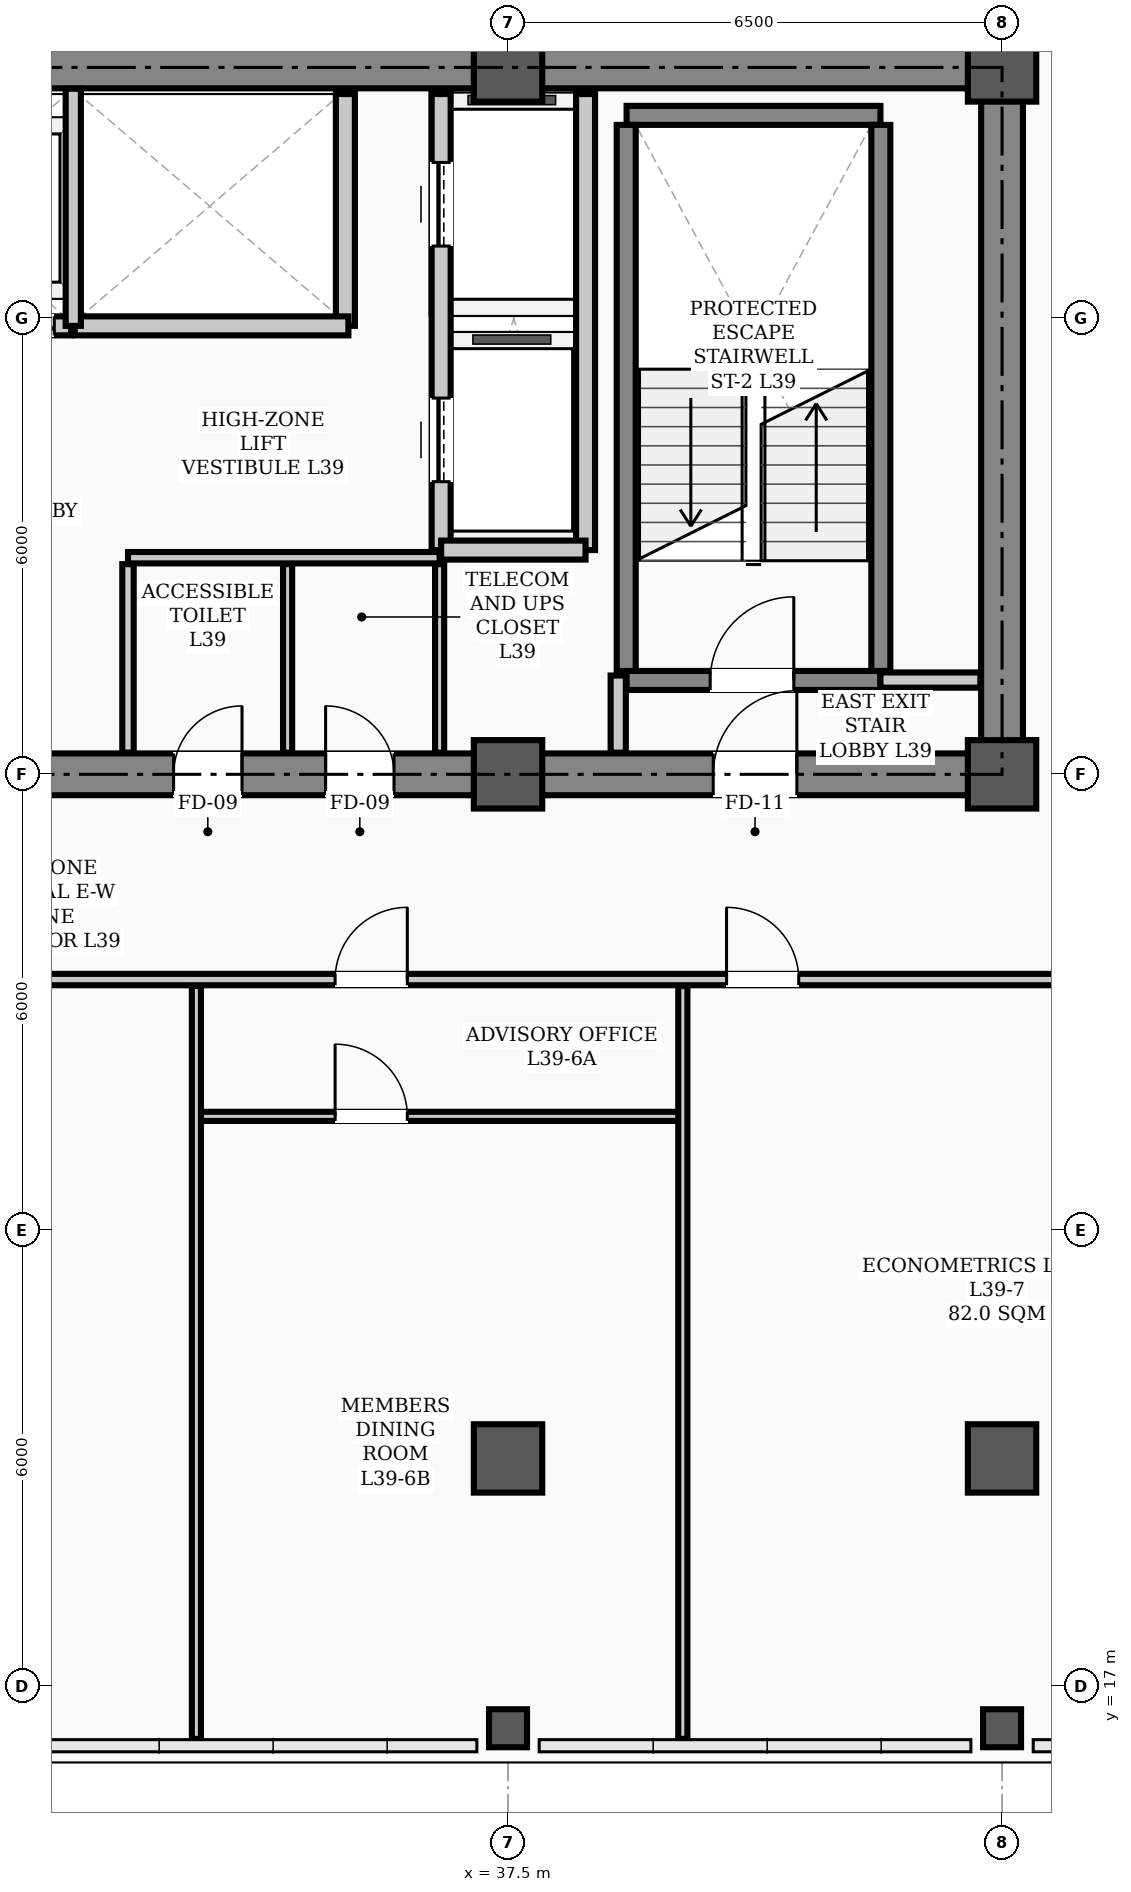
"""IFC4 building model, lengths in metres.
Left out: names, types, materials, properties, quantities, classifications, styles, units other than length and angle.
Written with IfcOpenShell. Run it as: python <this file> out.ifc"""

import sys

from ifc_helpers import new_model, si_unit, direction, frame, frame_2d, origin, origin_2d, place, context, subcontext, project, spatial, rectangle, hollow_rectangle, extrude, element, fill, save


model = new_model("IFC4")
c1 = context("Model", 3, precision=1e-05, world=origin(), true_north=direction((0.0, 1.0)))
c2 = subcontext(c1, "Body", "Model", "MODEL_VIEW")
j1 = project(units=[si_unit("LENGTHUNIT", "METRE"), si_unit("PLANEANGLEUNIT", "RADIAN")], contexts=[c1])
p1 = place(None, origin())
s1 = spatial("IfcSite", under=j1, at=p1, CompositionType="ELEMENT")
p2 = place(p1, origin())
s2 = spatial("IfcBuilding", under=s1, at=p2, CompositionType="ELEMENT")
p3 = place(p2, frame((0.0, 0.0, 157.8)))
s3 = spatial("IfcBuildingStorey", under=s2, at=p3, CompositionType="ELEMENT", Elevation=157.8)
for number, where, z_axis, x_axis in (
    (1, (37.5, 29.0, 0.0), (0.0, 0.0, 1.0), (1.0, 0.0, 0.0)),
    (2, (37.5, 38.3, 0.0), (0.0, 0.0, 1.0), (1.0, 0.0, 0.0)),
    (3, (44.0, 29.0, 0.0), (0.0, 0.0, 1.0), (1.0, 0.0, 0.0)),
    (4, (44.0, 38.3, 0.0), (0.0, 0.0, 1.0), (1.0, 0.0, 0.0)),
    (5, (37.5, 20.0, 0.0), (0.0, 0.0, 1.0), (1.0, 0.0, 0.0)),
    (6, (44.0, 20.0, 0.0), (0.0, 0.0, 1.0), (1.0, 0.0, 0.0)),
):
    element("IfcColumn", number, at=place(p3, frame(where, z_axis=z_axis, x_axis=x_axis)), inside=s3, PredefinedType="COLUMN", context=c2, shape_type="SweptSolid", body=[
        extrude(hollow_rectangle(XDim=0.9, YDim=0.9, WallThickness=0.035, InnerFilletRadius=0.017, OuterFilletRadius=0.052, at=origin_2d()), origin(), (0.0, 0.0, 1.0), 3.9),
    ])
for number, where, z_axis, x_axis in (
    (7, (37.5, 16.45, 0.0), (0.0, 0.0, 1.0), (1.0, 0.0, 0.0)),
    (8, (44.0, 16.45, 0.0), (0.0, 0.0, 1.0), (1.0, 0.0, 0.0)),
):
    element("IfcColumn", number, at=place(p3, frame(where, z_axis=z_axis, x_axis=x_axis)), inside=s3, PredefinedType="COLUMN", context=c2, shape_type="SweptSolid", body=[
        extrude(hollow_rectangle(XDim=0.5, YDim=0.5, WallThickness=0.024, InnerFilletRadius=0.012, OuterFilletRadius=0.036, at=origin_2d()), origin(), (0.0, 0.0, 1.0), 3.9),
    ])
p4 = place(p3, frame((13.5, 29.0, 0.0), z_axis=(0.0, 0.0, 1.0), x_axis=(1.0, 0.0, 0.0)))
e9 = element("IfcWall", 9, at=p4, inside=s3, PredefinedType="SHEAR", context=c2, shape_type="SweptSolid", body=[
    extrude(rectangle(XDim=30.5, YDim=0.55, at=frame_2d((15.25, 0.0))), origin(), (0.0, 0.0, 1.0), 3.72),
])
p5 = place(p4, frame((1.75, 0.0, 0.0)))
e10 = element("IfcOpeningElement", 10, at=p5, cuts=e9, PredefinedType="OPENING", context=c2, shape_type="SweptSolid", body=[
    extrude(rectangle(XDim=1.1, YDim=2.08, at=frame_2d((0.55, 1.04))), frame((0.0, 0.285, 0.0), z_axis=(0.0, -1.0, 0.0), x_axis=(1.0, 0.0, 0.0)), (0.0, 0.0, 1.0), 0.57),
])
p6 = place(p4, frame((26.7, 0.0, 0.0)))
e11 = element("IfcOpeningElement", 11, at=p6, cuts=e9, PredefinedType="OPENING", context=c2, shape_type="SweptSolid", body=[
    extrude(rectangle(XDim=1.1, YDim=2.08, at=frame_2d((0.55, 1.04))), frame((0.0, 0.285, 0.0), z_axis=(0.0, -1.0, 0.0), x_axis=(1.0, 0.0, 0.0)), (0.0, 0.0, 1.0), 0.57),
])
p7 = place(p4, frame((6.8, 0.0, 0.0)))
e12 = element("IfcOpeningElement", 12, at=p7, cuts=e9, PredefinedType="OPENING", context=c2, shape_type="SweptSolid", body=[
    extrude(rectangle(XDim=1.1, YDim=2.08, at=frame_2d((0.55, 1.04))), frame((0.0, 0.285, 0.0), z_axis=(0.0, -1.0, 0.0), x_axis=(1.0, 0.0, 0.0)), (0.0, 0.0, 1.0), 0.57),
])
p8 = place(p4, frame((13.2, 0.0, 0.0)))
e13 = element("IfcOpeningElement", 13, at=p8, cuts=e9, PredefinedType="OPENING", context=c2, shape_type="SweptSolid", body=[
    extrude(rectangle(XDim=1.6, YDim=2.08, at=frame_2d((0.8, 1.04))), frame((0.0, 0.285, 0.0), z_axis=(0.0, -1.0, 0.0), x_axis=(1.0, 0.0, 0.0)), (0.0, 0.0, 1.0), 0.57),
])
p9 = place(p4, frame((19.6, 0.0, 0.0)))
e14 = element("IfcOpeningElement", 14, at=p9, cuts=e9, PredefinedType="OPENING", context=c2, shape_type="SweptSolid", body=[
    extrude(rectangle(XDim=0.9, YDim=2.08, at=frame_2d((0.45, 1.04))), frame((0.0, 0.285, 0.0), z_axis=(0.0, -1.0, 0.0), x_axis=(1.0, 0.0, 0.0)), (0.0, 0.0, 1.0), 0.57),
])
p10 = place(p4, frame((21.6, 0.0, 0.0)))
e15 = element("IfcOpeningElement", 15, at=p10, cuts=e9, PredefinedType="OPENING", context=c2, shape_type="SweptSolid", body=[
    extrude(rectangle(XDim=0.9, YDim=2.08, at=frame_2d((0.45, 1.04))), frame((0.0, 0.285, 0.0), z_axis=(0.0, -1.0, 0.0), x_axis=(1.0, 0.0, 0.0)), (0.0, 0.0, 1.0), 0.57),
])
p11 = place(p3, frame((13.5, 38.3, 0.0), z_axis=(0.0, 0.0, 1.0), x_axis=(1.0, 0.0, 0.0)))
e16 = element("IfcWall", 16, at=p11, inside=s3, PredefinedType="SHEAR", context=c2, shape_type="SweptSolid", body=[
    extrude(rectangle(XDim=30.5, YDim=0.55, at=frame_2d((15.25, 0.0))), origin(), (0.0, 0.0, 1.0), 3.72),
])
p12 = place(p3, frame((44.0, 29.35, 0.0), z_axis=(0.0, 0.0, 1.0), x_axis=(0.0, 1.0, 0.0)))
e17 = element("IfcWall", 17, at=p12, inside=s3, PredefinedType="SHEAR", context=c2, shape_type="SweptSolid", body=[
    extrude(rectangle(XDim=8.6, YDim=0.55, at=frame_2d((4.3, 0.0))), origin(), (0.0, 0.0, 1.0), 3.72),
])
p13 = place(p3, frame((39.06, 30.235, 0.0), z_axis=(0.0, 0.0, 1.0), x_axis=(1.0, 0.0, 0.0)))
e18 = element("IfcWall", 18, at=p13, inside=s3, PredefinedType="STANDARD", context=c2, shape_type="SweptSolid", body=[
    extrude(rectangle(XDim=3.34, YDim=0.25, at=frame_2d((1.67, 0.0))), origin(), (0.0, 0.0, 1.0), 3.72),
])
p14 = place(p13, frame((1.1, 0.0, 0.0)))
e19 = element("IfcOpeningElement", 19, at=p14, cuts=e18, PredefinedType="OPENING", context=c2, shape_type="SweptSolid", body=[
    extrude(rectangle(XDim=1.1, YDim=2.08, at=frame_2d((0.55, 1.04))), frame((0.0, 0.135, 0.0), z_axis=(0.0, -1.0, 0.0), x_axis=(1.0, 0.0, 0.0)), (0.0, 0.0, 1.0), 0.27),
])
p15 = place(p3, frame((39.06, 37.669, 0.0), z_axis=(0.0, 0.0, 1.0), x_axis=(1.0, 0.0, 0.0)))
e20 = element("IfcWall", 20, at=p15, inside=s3, PredefinedType="STANDARD", context=c2, shape_type="SweptSolid", body=[
    extrude(rectangle(XDim=3.34, YDim=0.25, at=frame_2d((1.67, 0.0))), origin(), (0.0, 0.0, 1.0), 3.72),
])
for number, where, z_axis, x_axis in (
    (21, (39.055, 30.36, 0.0), (0.0, 0.0, 1.0), (0.0, 1.0, 0.0)),
    (22, (42.405, 30.36, 0.0), (0.0, 0.0, 1.0), (0.0, 1.0, 0.0)),
):
    element("IfcWall", number, at=place(p3, frame(where, z_axis=z_axis, x_axis=x_axis)), inside=s3, PredefinedType="STANDARD", context=c2, shape_type="SweptSolid", body=[
        extrude(rectangle(XDim=7.184, YDim=0.25, at=frame_2d((3.592, 0.0))), origin(), (0.0, 0.0, 1.0), 3.72),
    ])
p16 = place(p3, frame((36.62, 31.95, 0.0), z_axis=(0.0, 0.0, 1.0), x_axis=(0.0, 1.0, 0.0)))
e23 = element("IfcWall", 23, at=p16, inside=s3, PredefinedType="STANDARD", context=c2, shape_type="SweptSolid", body=[
    extrude(rectangle(XDim=6.0, YDim=0.25, at=frame_2d((3.0, 0.0))), origin(), (0.0, 0.0, 1.0), 3.35),
])
p17 = place(p16, frame((0.9, 0.0, 0.0)))
e24 = element("IfcOpeningElement", 24, at=p17, cuts=e23, PredefinedType="OPENING", context=c2, shape_type="SweptSolid", body=[
    extrude(rectangle(XDim=1.1, YDim=2.08, at=frame_2d((0.55, 1.04))), frame((0.0, 0.135, 0.0), z_axis=(0.0, -1.0, 0.0), x_axis=(1.0, 0.0, 0.0)), (0.0, 0.0, 1.0), 0.27),
])
p18 = place(p16, frame((4.0, 0.0, 0.0)))
e25 = element("IfcOpeningElement", 25, at=p18, cuts=e23, PredefinedType="OPENING", context=c2, shape_type="SweptSolid", body=[
    extrude(rectangle(XDim=1.1, YDim=2.08, at=frame_2d((0.55, 1.04))), frame((0.0, 0.135, 0.0), z_axis=(0.0, -1.0, 0.0), x_axis=(1.0, 0.0, 0.0)), (0.0, 0.0, 1.0), 0.27),
])
p19 = place(p3, frame((38.52, 31.95, 0.0), z_axis=(0.0, 0.0, 1.0), x_axis=(0.0, 1.0, 0.0)))
e26 = element("IfcWall", 26, at=p19, inside=s3, PredefinedType="STANDARD", context=c2, shape_type="SweptSolid", body=[
    extrude(rectangle(XDim=6.0, YDim=0.25, at=frame_2d((3.0, 0.0))), origin(), (0.0, 0.0, 1.0), 3.35),
])
p20 = place(p3, frame((36.62, 31.95, 0.0), z_axis=(0.0, 0.0, 1.0), x_axis=(1.0, 0.0, 0.0)))
e27 = element("IfcWall", 27, at=p20, inside=s3, PredefinedType="STANDARD", context=c2, shape_type="SweptSolid", body=[
    extrude(rectangle(XDim=1.9, YDim=0.25, at=frame_2d((0.95, 0.0))), origin(), (0.0, 0.0, 1.0), 3.48),
])
p21 = place(p3, frame((35.36, 34.9, 0.0), z_axis=(0.0, 0.0, 1.0), x_axis=(0.0, 1.0, 0.0)))
e28 = element("IfcWall", 28, at=p21, inside=s3, PredefinedType="STANDARD", context=c2, shape_type="SweptSolid", body=[
    extrude(rectangle(XDim=3.05, YDim=0.25, at=frame_2d((1.525, 0.0))), origin(), (0.0, 0.0, 1.0), 3.35),
])
p22 = place(p3, frame((28.2, 34.9, 0.0), z_axis=(0.0, 0.0, 1.0), x_axis=(1.0, 0.0, 0.0)))
e29 = element("IfcWall", 29, at=p22, inside=s3, PredefinedType="STANDARD", context=c2, shape_type="SweptSolid", body=[
    extrude(rectangle(XDim=3.55, YDim=0.25, at=frame_2d((1.775, 0.0))), origin(), (0.0, 0.0, 1.0), 3.72),
])
p23 = place(p22, frame((0.23, 0.0, 0.0)))
e30 = element("IfcOpeningElement", 30, at=p23, cuts=e29, PredefinedType="OPENING", context=c2, shape_type="SweptSolid", body=[
    extrude(rectangle(XDim=1.3, YDim=2.08, at=frame_2d((0.65, 1.04))), frame((0.0, 0.135, 0.0), z_axis=(0.0, -1.0, 0.0), x_axis=(1.0, 0.0, 0.0)), (0.0, 0.0, 1.0), 0.27),
])
p24 = place(p22, frame((2.03, 0.0, 0.0)))
e31 = element("IfcOpeningElement", 31, at=p24, cuts=e29, PredefinedType="OPENING", context=c2, shape_type="SweptSolid", body=[
    extrude(rectangle(XDim=1.3, YDim=2.08, at=frame_2d((0.65, 1.04))), frame((0.0, 0.135, 0.0), z_axis=(0.0, -1.0, 0.0), x_axis=(1.0, 0.0, 0.0)), (0.0, 0.0, 1.0), 0.27),
])
p25 = place(p3, frame((31.8, 34.9, 0.0), z_axis=(0.0, 0.0, 1.0), x_axis=(1.0, 0.0, 0.0)))
e32 = element("IfcWall", 32, at=p25, inside=s3, PredefinedType="STANDARD", context=c2, shape_type="SweptSolid", body=[
    extrude(rectangle(XDim=3.6, YDim=0.25, at=frame_2d((1.8, 0.0))), origin(), (0.0, 0.0, 1.0), 3.72),
])
p26 = place(p3, frame((42.4, 30.24, 0.0), z_axis=(0.0, 0.0, 1.0), x_axis=(1.0, 0.0, 0.0)))
e33 = element("IfcWall", 33, at=p26, inside=s3, PredefinedType="STANDARD", context=c2, shape_type="SweptSolid", body=[
    extrude(rectangle(XDim=1.315, YDim=0.2, at=frame_2d((0.658, 0.0))), origin(), (0.0, 0.0, 1.0), 3.2),
])
p27 = place(p3, frame((32.5, 31.85, 0.0), z_axis=(0.0, 0.0, 1.0), x_axis=(1.0, 0.0, 0.0)))
e34 = element("IfcWall", 34, at=p27, inside=s3, PredefinedType="PARTITIONING", context=c2, shape_type="SweptSolid", body=[
    extrude(rectangle(XDim=4.1, YDim=0.15, at=frame_2d((2.05, 0.0))), origin(), (0.0, 0.0, 1.0), 3.72),
])
p28 = place(p3, frame((2.31, 26.3, 0.0), z_axis=(0.0, 0.0, 1.0), x_axis=(1.0, 0.0, 0.0)))
e35 = element("IfcWall", 35, at=p28, inside=s3, PredefinedType="PARTITIONING", context=c2, shape_type="SweptSolid", body=[
    extrude(rectangle(XDim=46.38, YDim=0.15, at=frame_2d((23.19, 0.0))), origin(), (0.0, 0.0, 1.0), 3.2),
])
p29 = place(p28, frame((9.19, 0.0, 0.0)))
e36 = element("IfcOpeningElement", 36, at=p29, cuts=e35, PredefinedType="OPENING", context=c2, shape_type="SweptSolid", body=[
    extrude(rectangle(XDim=0.95, YDim=2.08, at=frame_2d((0.475, 1.04))), frame((0.0, 0.085, 0.0), z_axis=(0.0, -1.0, 0.0), x_axis=(1.0, 0.0, 0.0)), (0.0, 0.0, 1.0), 0.17),
])
p30 = place(p28, frame((14.815, 0.0, 0.0)))
e37 = element("IfcOpeningElement", 37, at=p30, cuts=e35, PredefinedType="OPENING", context=c2, shape_type="SweptSolid", body=[
    extrude(rectangle(XDim=0.95, YDim=2.08, at=frame_2d((0.475, 1.04))), frame((0.0, 0.085, 0.0), z_axis=(0.0, -1.0, 0.0), x_axis=(1.0, 0.0, 0.0)), (0.0, 0.0, 1.0), 0.17),
])
p31 = place(p28, frame((19.015, 0.0, 0.0)))
e38 = element("IfcOpeningElement", 38, at=p31, cuts=e35, PredefinedType="OPENING", context=c2, shape_type="SweptSolid", body=[
    extrude(rectangle(XDim=0.95, YDim=2.08, at=frame_2d((0.475, 1.04))), frame((0.0, 0.085, 0.0), z_axis=(0.0, -1.0, 0.0), x_axis=(1.0, 0.0, 0.0)), (0.0, 0.0, 1.0), 0.17),
])
p32 = place(p28, frame((26.315, 0.0, 0.0)))
e39 = element("IfcOpeningElement", 39, at=p32, cuts=e35, PredefinedType="OPENING", context=c2, shape_type="SweptSolid", body=[
    extrude(rectangle(XDim=0.95, YDim=2.08, at=frame_2d((0.475, 1.04))), frame((0.0, 0.085, 0.0), z_axis=(0.0, -1.0, 0.0), x_axis=(1.0, 0.0, 0.0)), (0.0, 0.0, 1.0), 0.17),
])
p33 = place(p28, frame((32.915, 0.0, 0.0)))
e40 = element("IfcOpeningElement", 40, at=p33, cuts=e35, PredefinedType="OPENING", context=c2, shape_type="SweptSolid", body=[
    extrude(rectangle(XDim=0.95, YDim=2.08, at=frame_2d((0.475, 1.04))), frame((0.0, 0.085, 0.0), z_axis=(0.0, -1.0, 0.0), x_axis=(1.0, 0.0, 0.0)), (0.0, 0.0, 1.0), 0.17),
])
p34 = place(p28, frame((38.065, 0.0, 0.0)))
e41 = element("IfcOpeningElement", 41, at=p34, cuts=e35, PredefinedType="OPENING", context=c2, shape_type="SweptSolid", body=[
    extrude(rectangle(XDim=0.95, YDim=2.08, at=frame_2d((0.475, 1.04))), frame((0.0, 0.085, 0.0), z_axis=(0.0, -1.0, 0.0), x_axis=(1.0, 0.0, 0.0)), (0.0, 0.0, 1.0), 0.17),
])
p35 = place(p3, frame((33.4, 24.5, 0.0), z_axis=(0.0, 0.0, 1.0), x_axis=(1.0, 0.0, 0.0)))
e42 = element("IfcWall", 42, at=p35, inside=s3, PredefinedType="PARTITIONING", context=c2, shape_type="SweptSolid", body=[
    extrude(rectangle(XDim=6.4, YDim=0.12, at=frame_2d((3.2, 0.0))), origin(), (0.0, 0.0, 1.0), 3.2),
])
p36 = place(p35, frame((1.825, 0.0, 0.0)))
e43 = element("IfcOpeningElement", 43, at=p36, cuts=e42, PredefinedType="OPENING", context=c2, shape_type="SweptSolid", body=[
    extrude(rectangle(XDim=0.95, YDim=2.08, at=frame_2d((0.475, 1.04))), frame((0.0, 0.07, 0.0), z_axis=(0.0, -1.0, 0.0), x_axis=(1.0, 0.0, 0.0)), (0.0, 0.0, 1.0), 0.14),
])
p37 = place(p3, frame((38.95, 29.285, 0.0), z_axis=(0.0, 0.0, 1.0), x_axis=(0.0, 1.0, 0.0)))
e44 = element("IfcWall", 44, at=p37, inside=s3, PredefinedType="STANDARD", context=c2, shape_type="SweptSolid", body=[
    extrude(rectangle(XDim=1.015, YDim=0.2, at=frame_2d((0.508, 0.0))), origin(), (0.0, 0.0, 1.0), 3.35),
])
p38 = place(p3, frame((32.5, 29.285, 0.0), z_axis=(0.0, 0.0, 1.0), x_axis=(0.0, 1.0, 0.0)))
e45 = element("IfcWall", 45, at=p38, inside=s3, PredefinedType="PARTITIONING", context=c2, shape_type="SweptSolid", body=[
    extrude(rectangle(XDim=2.48, YDim=0.15, at=frame_2d((1.24, 0.0))), origin(), (0.0, 0.0, 1.0), 3.35),
])
for number, where, z_axis, x_axis in (
    (46, (36.6, 29.285, 0.0), (0.0, 0.0, 1.0), (0.0, 1.0, 0.0)),
    (47, (34.6, 29.285, 0.0), (0.0, 0.0, 1.0), (0.0, 1.0, 0.0)),
):
    element("IfcWall", number, at=place(p3, frame(where, z_axis=z_axis, x_axis=x_axis)), inside=s3, PredefinedType="PARTITIONING", context=c2, shape_type="SweptSolid", body=[
        extrude(rectangle(XDim=2.48, YDim=0.12, at=frame_2d((1.24, 0.0))), origin(), (0.0, 0.0, 1.0), 3.35),
    ])
for number, where, z_axis, x_axis in (
    (48, (33.4, 16.31, 0.0), (0.0, 0.0, 1.0), (0.0, 1.0, 0.0)),
    (49, (39.8, 16.31, 0.0), (0.0, 0.0, 1.0), (0.0, 1.0, 0.0)),
):
    element("IfcWall", number, at=place(p3, frame(where, z_axis=z_axis, x_axis=x_axis)), inside=s3, PredefinedType="PARTITIONING", context=c2, shape_type="SweptSolid", body=[
        extrude(rectangle(XDim=9.905, YDim=0.12, at=frame_2d((4.953, 0.0))), origin(), (0.0, 0.0, 1.0), 3.1),
    ])
p39 = place(p3, frame((31.78, 34.9, 0.0), z_axis=(0.0, 0.0, 1.0), x_axis=(0.0, 1.0, 0.0)))
e50 = element("IfcWall", 50, at=p39, inside=s3, PredefinedType="STANDARD", context=c2, shape_type="SweptSolid", body=[
    extrude(rectangle(XDim=3.12, YDim=0.2, at=frame_2d((1.56, 0.0))), origin(), (0.0, 0.0, 1.0), 3.35),
])
p40 = place(p14, origin())
e51 = element("IfcDoor", 51, at=p40, inside=s3, OperationType="SINGLE_SWING_RIGHT", PredefinedType="DOOR", context=c2, shape_type="SweptSolid", body=[
    extrude(rectangle(XDim=1.1, YDim=2.08, at=frame_2d((0.55, 1.04))), frame((0.0, 0.025, 0.0), z_axis=(0.0, -1.0, 0.0), x_axis=(1.0, 0.0, 0.0)), (0.0, 0.0, 1.0), 0.05),
])
fill(e19, e51)
p41 = place(p6, origin())
e52 = element("IfcDoor", 52, at=p41, inside=s3, OperationType="SINGLE_SWING_RIGHT", PredefinedType="DOOR", context=c2, shape_type="SweptSolid", body=[
    extrude(rectangle(XDim=1.1, YDim=2.08, at=frame_2d((0.55, 1.04))), frame((0.0, 0.025, 0.0), z_axis=(0.0, -1.0, 0.0), x_axis=(1.0, 0.0, 0.0)), (0.0, 0.0, 1.0), 0.05),
])
fill(e11, e52)
p42 = place(p9, origin())
e53 = element("IfcDoor", 53, at=p42, inside=s3, OperationType="SINGLE_SWING_RIGHT", PredefinedType="DOOR", context=c2, shape_type="SweptSolid", body=[
    extrude(rectangle(XDim=0.9, YDim=2.08, at=frame_2d((0.45, 1.04))), frame((0.0, 0.025, 0.0), z_axis=(0.0, -1.0, 0.0), x_axis=(1.0, 0.0, 0.0)), (0.0, 0.0, 1.0), 0.05),
])
fill(e14, e53)
p43 = place(p10, origin())
e54 = element("IfcDoor", 54, at=p43, inside=s3, OperationType="SINGLE_SWING_LEFT", PredefinedType="DOOR", context=c2, shape_type="SweptSolid", body=[
    extrude(rectangle(XDim=0.9, YDim=2.08, at=frame_2d((0.45, 1.04))), frame((0.0, 0.025, 0.0), z_axis=(0.0, -1.0, 0.0), x_axis=(1.0, 0.0, 0.0)), (0.0, 0.0, 1.0), 0.05),
])
fill(e15, e54)
p44 = place(p36, origin())
e55 = element("IfcDoor", 55, at=p44, inside=s3, OperationType="SINGLE_SWING_LEFT", PredefinedType="DOOR", context=c2, shape_type="SweptSolid", body=[
    extrude(rectangle(XDim=0.95, YDim=2.08, at=frame_2d((0.475, 1.04))), frame((0.0, 0.025, 0.0), z_axis=(0.0, -1.0, 0.0), x_axis=(1.0, 0.0, 0.0)), (0.0, 0.0, 1.0), 0.05),
])
fill(e43, e55)
p45 = place(p33, origin())
e56 = element("IfcDoor", 56, at=p45, inside=s3, OperationType="SINGLE_SWING_RIGHT", PredefinedType="DOOR", context=c2, shape_type="SweptSolid", body=[
    extrude(rectangle(XDim=0.95, YDim=2.08, at=frame_2d((0.475, 1.04))), frame((0.0, 0.025, 0.0), z_axis=(0.0, -1.0, 0.0), x_axis=(1.0, 0.0, 0.0)), (0.0, 0.0, 1.0), 0.05),
])
fill(e40, e56)
p46 = place(p34, origin())
e57 = element("IfcDoor", 57, at=p46, inside=s3, OperationType="SINGLE_SWING_LEFT", PredefinedType="DOOR", context=c2, shape_type="SweptSolid", body=[
    extrude(rectangle(XDim=0.95, YDim=2.08, at=frame_2d((0.475, 1.04))), frame((0.0, 0.025, 0.0), z_axis=(0.0, -1.0, 0.0), x_axis=(1.0, 0.0, 0.0)), (0.0, 0.0, 1.0), 0.05),
])
fill(e41, e57)
p47 = place(p17, origin())
e58 = element("IfcDoor", 58, at=p47, inside=s3, OperationType="SLIDING_TO_LEFT", PredefinedType="DOOR", context=c2, shape_type="SweptSolid", body=[
    extrude(rectangle(XDim=1.1, YDim=2.08, at=frame_2d((0.55, 1.04))), frame((0.0, 0.025, 0.0), z_axis=(0.0, -1.0, 0.0), x_axis=(1.0, 0.0, 0.0)), (0.0, 0.0, 1.0), 0.05),
])
fill(e24, e58)
p48 = place(p18, origin())
e59 = element("IfcDoor", 59, at=p48, inside=s3, OperationType="SLIDING_TO_LEFT", PredefinedType="DOOR", context=c2, shape_type="SweptSolid", body=[
    extrude(rectangle(XDim=1.1, YDim=2.08, at=frame_2d((0.55, 1.04))), frame((0.0, 0.025, 0.0), z_axis=(0.0, -1.0, 0.0), x_axis=(1.0, 0.0, 0.0)), (0.0, 0.0, 1.0), 0.05),
])
fill(e25, e59)
p49 = place(p24, origin())
e60 = element("IfcDoor", 60, at=p49, inside=s3, OperationType="DOUBLE_DOOR_SLIDING", PredefinedType="DOOR", context=c2, shape_type="SweptSolid", body=[
    extrude(rectangle(XDim=1.3, YDim=2.08, at=frame_2d((0.65, 1.04))), frame((0.0, 0.025, 0.0), z_axis=(0.0, -1.0, 0.0), x_axis=(1.0, 0.0, 0.0)), (0.0, 0.0, 1.0), 0.05),
])
fill(e31, e60)
save(model, sys.argv[1])
